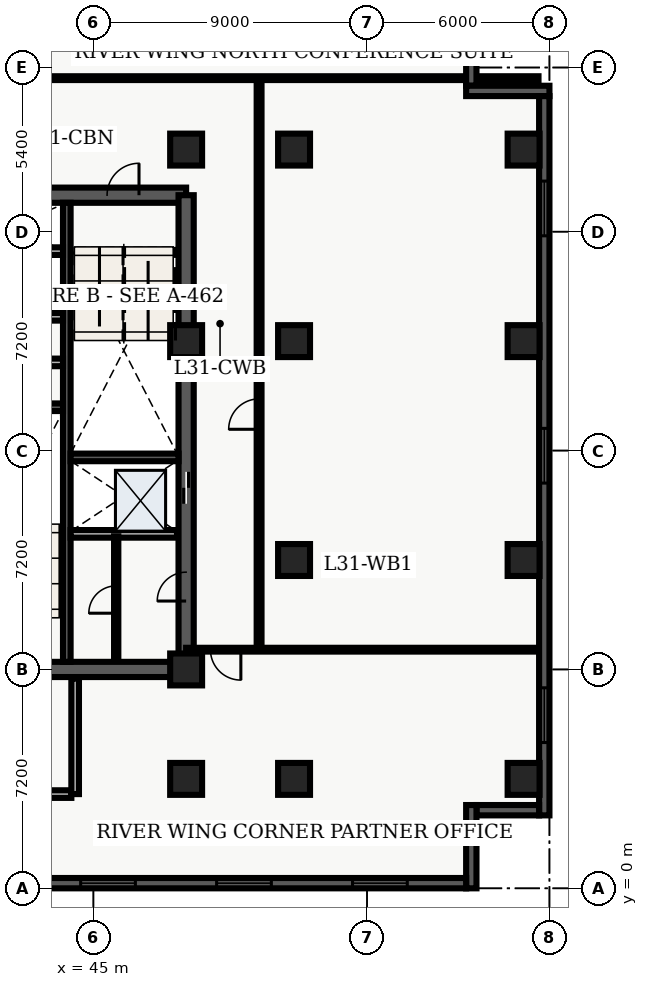
"""IFC4 building model, lengths in metres.
Left out: names, types, materials, properties, quantities, classifications, styles, units other than length and angle.
Written with IfcOpenShell. Run it as: python <this file> out.ifc"""

import sys

from ifc_helpers import new_model, entity, si_unit, converted_unit, direction, frame, origin_with_axes, origin_2d_with_axis, place, context, subcontext, project, spatial, polyline, rectangle, outline, extrude, element, fill, save


model = new_model("IFC4")
c1 = context("Model", 3, precision=1e-05, world=origin_with_axes(), true_north=direction((0.0, 1.0)))
c2 = subcontext(c1, "Body", "Model", "MODEL_VIEW")
j1 = project(units=[si_unit("LENGTHUNIT", "METRE"), converted_unit("PLANEANGLEUNIT", "DEGREE", entity("IfcPlaneAngleMeasure", 0.017), si_unit("PLANEANGLEUNIT", "RADIAN"), dimensions=[0, 0, 0, 0, 0, 0, 0])], contexts=[c1])
p1 = place(None, origin_with_axes())
s1 = spatial("IfcSite", under=j1, at=p1, CompositionType="ELEMENT")
p2 = place(p1, origin_with_axes())
s2 = spatial("IfcBuilding", under=s1, at=p2, CompositionType="ELEMENT")
p3 = place(p2, frame((0.0, 0.0, 129.0), z_axis=(0.0, 0.0, 1.0), x_axis=(1.0, 0.0, 0.0)))
s3 = spatial("IfcBuildingStorey", under=s2, at=p3, CompositionType="ELEMENT", Elevation=129.0)
p4 = place(p3, frame((40.2, 7.2, 0.0), z_axis=(0.0, 0.0, 1.0), x_axis=(1.0, 0.0, 0.0)))
e1 = element("IfcWall", 1, at=p4, inside=s3, PredefinedType="SHEAR", context=c2, shape_type="SweptSolid", body=[
    extrude(outline(polyline([(0.0, -0.25), (7.85, -0.25), (7.85, 0.25), (0.0, 0.25), (0.0, -0.25)])), origin_with_axes(), (0.0, 0.0, 1.0), 3.66),
])
p5 = place(p4, frame((2.175, 0.0, 0.0), z_axis=(0.0, 0.0, 1.0), x_axis=(1.0, 0.0, 0.0)))
e2 = element("IfcOpeningElement", 2, at=p5, cuts=e1, PredefinedType="OPENING", context=c2, shape_type="SweptSolid", body=[
    extrude(rectangle(XDim=1.05, YDim=0.52, at=origin_2d_with_axis()), origin_with_axes(), (0.0, 0.0, 1.0), 2.15),
])
p6 = place(p3, frame((40.2, 22.8, 0.0), z_axis=(0.0, 0.0, 1.0), x_axis=(1.0, 0.0, 0.0)))
e3 = element("IfcWall", 3, at=p6, inside=s3, PredefinedType="SHEAR", context=c2, shape_type="SweptSolid", body=[
    extrude(outline(polyline([(0.0, -0.25), (7.85, -0.25), (7.85, 0.25), (0.0, 0.25), (0.0, -0.25)])), origin_with_axes(), (0.0, 0.0, 1.0), 3.66),
])
p7 = place(p6, frame((5.775, 0.0, 0.0), z_axis=(0.0, 0.0, 1.0), x_axis=(1.0, 0.0, 0.0)))
e4 = element("IfcOpeningElement", 4, at=p7, cuts=e3, PredefinedType="OPENING", context=c2, shape_type="SweptSolid", body=[
    extrude(rectangle(XDim=1.05, YDim=0.52, at=origin_2d_with_axis()), origin_with_axes(), (0.0, 0.0, 1.0), 2.15),
])
p8 = place(p3, frame((48.05, 7.2, 0.0), z_axis=(0.0, 0.0, 1.0), x_axis=(0.0, 1.0, 0.0)))
e5 = element("IfcWall", 5, at=p8, inside=s3, PredefinedType="SHEAR", context=c2, shape_type="SweptSolid", body=[
    extrude(outline(polyline([(0.0, -0.25), (15.6, -0.25), (15.6, 0.25), (0.0, 0.25), (0.0, -0.25)])), origin_with_axes(), (0.0, 0.0, 1.0), 3.66),
])
p9 = place(p8, frame((5.975, 0.0, 0.0), z_axis=(0.0, 0.0, 1.0), x_axis=(1.0, 0.0, 0.0)))
e6 = element("IfcOpeningElement", 6, at=p9, cuts=e5, PredefinedType="OPENING", context=c2, shape_type="SweptSolid", body=[
    extrude(rectangle(XDim=1.05, YDim=0.52, at=origin_2d_with_axis()), origin_with_axes(), (0.0, 0.0, 1.0), 2.15),
])
p10 = place(p8, frame((2.725, 0.0, 0.0), z_axis=(0.0, 0.0, 1.0), x_axis=(1.0, 0.0, 0.0)))
e7 = element("IfcOpeningElement", 7, at=p10, cuts=e5, PredefinedType="OPENING", context=c2, shape_type="SweptSolid", body=[
    extrude(rectangle(XDim=0.95, YDim=0.52, at=origin_2d_with_axis()), origin_with_axes(), (0.0, 0.0, 1.0), 2.15),
])
p11 = place(p3, frame((44.125, 7.45, 0.0), z_axis=(0.0, 0.0, 1.0), x_axis=(0.0, 1.0, 0.0)))
e8 = element("IfcWall", 8, at=p11, inside=s3, PredefinedType="SHEAR", context=c2, shape_type="SweptSolid", body=[
    extrude(outline(polyline([(0.0, -0.125), (15.1, -0.125), (15.1, 0.125), (0.0, 0.125), (0.0, -0.125)])), origin_with_axes(), (0.0, 0.0, 1.0), 3.66),
])
for number, where, z_axis, x_axis in (
    (9, (40.45, 15.825, 0.0), (0.0, 0.0, 1.0), (1.0, 0.0, 0.0)),
    (10, (44.25, 14.175, 0.0), (0.0, 0.0, 1.0), (1.0, 0.0, 0.0)),
):
    element("IfcWall", number, at=place(p3, frame(where, z_axis=z_axis, x_axis=x_axis)), inside=s3, PredefinedType="SHEAR", context=c2, shape_type="SweptSolid", body=[
        extrude(outline(polyline([(0.0, -0.125), (3.55, -0.125), (3.55, 0.125), (0.0, 0.125), (0.0, -0.125)])), origin_with_axes(), (0.0, 0.0, 1.0), 3.66),
    ])
p12 = place(p3, frame((40.5, 17.3, 0.0), z_axis=(0.0, 0.0, 1.0), x_axis=(1.0, 0.0, 0.0)))
e11 = element("IfcWall", 11, at=p12, inside=s3, PredefinedType="SOLIDWALL", context=c2, shape_type="SweptSolid", body=[
    extrude(outline(polyline([(0.0, -0.125), (3.5, -0.125), (3.5, 0.125), (0.0, 0.125), (0.0, -0.125)])), origin_with_axes(), (0.0, 0.0, 1.0), 2.7),
])
p13 = place(p12, frame((2.4, 0.0, 0.0), z_axis=(0.0, 0.0, 1.0), x_axis=(1.0, 0.0, 0.0)))
e12 = element("IfcOpeningElement", 12, at=p13, cuts=e11, PredefinedType="OPENING", context=c2, shape_type="SweptSolid", body=[
    extrude(rectangle(XDim=0.9, YDim=0.27, at=origin_2d_with_axis()), origin_with_axes(), (0.0, 0.0, 1.0), 2.15),
])
p14 = place(p3, frame((40.5, 18.8, 0.0), z_axis=(0.0, 0.0, 1.0), x_axis=(1.0, 0.0, 0.0)))
e13 = element("IfcWall", 13, at=p14, inside=s3, PredefinedType="SOLIDWALL", context=c2, shape_type="SweptSolid", body=[
    extrude(outline(polyline([(0.0, -0.125), (3.5, -0.125), (3.5, 0.125), (0.0, 0.125), (0.0, -0.125)])), origin_with_axes(), (0.0, 0.0, 1.0), 2.7),
])
p15 = place(p3, frame((40.325, 3.1, 0.0), z_axis=(0.0, 0.0, 1.0), x_axis=(1.0, 0.0, 0.0)))
e14 = element("IfcWall", 14, at=p15, inside=s3, PredefinedType="SOLIDWALL", context=c2, shape_type="SweptSolid", body=[
    extrude(outline(polyline([(0.0, -0.125), (3.95, -0.125), (3.95, 0.125), (0.0, 0.125), (0.0, -0.125)])), origin_with_axes(), (0.0, 0.0, 1.0), 2.7),
])
p16 = place(p3, frame((44.4, 3.1, 0.0), z_axis=(0.0, 0.0, 1.0), x_axis=(0.0, 1.0, 0.0)))
e15 = element("IfcWall", 15, at=p16, inside=s3, PredefinedType="SOLIDWALL", context=c2, shape_type="SweptSolid", body=[
    extrude(outline(polyline([(0.0, -0.125), (3.8, -0.125), (3.8, 0.125), (0.0, 0.125), (0.0, -0.125)])), origin_with_axes(), (0.0, 0.0, 1.0), 2.7),
])
for number, where, z_axis, x_axis in (
    (16, (48.05, 3.6, 0.0), (0.0, 0.0, 1.0), (1.0, 0.0, 0.0)),
    (17, (48.05, 7.2, 0.0), (0.0, 0.0, 1.0), (1.0, 0.0, 0.0)),
    (18, (48.05, 18.0, 0.0), (0.0, 0.0, 1.0), (1.0, 0.0, 0.0)),
    (19, (48.05, 24.3, 0.0), (0.0, 0.0, 1.0), (1.0, 0.0, 0.0)),
    (20, (51.6, 3.6, 0.0), (0.0, 0.0, 1.0), (1.0, 0.0, 0.0)),
    (21, (51.6, 10.8, 0.0), (0.0, 0.0, 1.0), (1.0, 0.0, 0.0)),
    (22, (51.6, 18.0, 0.0), (0.0, 0.0, 1.0), (1.0, 0.0, 0.0)),
    (23, (51.6, 24.3, 0.0), (0.0, 0.0, 1.0), (1.0, 0.0, 0.0)),
    (24, (59.15, 3.6, 0.0), (0.0, 0.0, 1.0), (1.0, 0.0, 0.0)),
    (25, (59.15, 10.8, 0.0), (0.0, 0.0, 1.0), (1.0, 0.0, 0.0)),
    (26, (59.15, 18.0, 0.0), (0.0, 0.0, 1.0), (1.0, 0.0, 0.0)),
    (27, (59.15, 24.3, 0.0), (0.0, 0.0, 1.0), (1.0, 0.0, 0.0)),
):
    element("IfcColumn", number, at=place(p3, frame(where, z_axis=z_axis, x_axis=x_axis)), inside=s3, PredefinedType="COLUMN", context=c2, shape_type="SweptSolid", body=[
        extrude(rectangle(XDim=1.05, YDim=1.05, at=origin_2d_with_axis()), origin_with_axes(), (0.0, 0.0, 1.0), 3.9),
    ])
for number, where, z_axis, x_axis in (
    (28, (40.5, 20.96, 0.0), (0.0, 0.0, 1.0), (1.0, 0.0, 0.0)),
    (29, (44.25, 11.66, 0.0), (0.0, 0.0, 1.0), (1.0, 0.0, 0.0)),
):
    element("IfcWall", number, at=place(p3, frame(where, z_axis=z_axis, x_axis=x_axis)), inside=s3, PredefinedType="SOLIDWALL", context=c2, shape_type="SweptSolid", body=[
        extrude(outline(polyline([(0.0, -0.125), (3.5, -0.125), (3.5, 0.125), (0.0, 0.125), (0.0, -0.125)])), origin_with_axes(), (0.0, 0.0, 1.0), 2.7),
    ])
p17 = place(p3, frame((45.75, 7.5, 0.0), z_axis=(0.0, 0.0, 1.0), x_axis=(0.0, 1.0, 0.0)))
e30 = element("IfcWall", 30, at=p17, inside=s3, PredefinedType="PARTITIONING", context=c2, shape_type="SweptSolid", body=[
    extrude(outline(polyline([(0.0, -0.07), (4.08, -0.07), (4.08, 0.07), (0.0, 0.07), (0.0, -0.07)])), origin_with_axes(), (0.0, 0.0, 1.0), 2.7),
])
p18 = place(p17, frame((2.0, 0.0, 0.0), z_axis=(0.0, 0.0, 1.0), x_axis=(1.0, 0.0, 0.0)))
e31 = element("IfcOpeningElement", 31, at=p18, cuts=e30, PredefinedType="OPENING", context=c2, shape_type="SweptSolid", body=[
    extrude(rectangle(XDim=0.9, YDim=0.16, at=origin_2d_with_axis()), origin_with_axes(), (0.0, 0.0, 1.0), 2.15),
])
p19 = place(p3, frame((50.45, 7.85, 0.0), z_axis=(0.0, 0.0, 1.0), x_axis=(0.0, 1.0, 0.0)))
e32 = element("IfcWall", 32, at=p19, inside=s3, PredefinedType="PARTITIONING", context=c2, shape_type="SweptSolid", body=[
    extrude(outline(polyline([(0.0, -0.08), (18.8, -0.08), (18.8, 0.08), (0.0, 0.08), (0.0, -0.08)])), origin_with_axes(), (0.0, 0.0, 1.0), 2.7),
])
p20 = place(p19, frame((7.75, 0.0, 0.0), z_axis=(0.0, 0.0, 1.0), x_axis=(1.0, 0.0, 0.0)))
e33 = element("IfcOpeningElement", 33, at=p20, cuts=e32, PredefinedType="OPENING", context=c2, shape_type="SweptSolid", body=[
    extrude(rectangle(XDim=1.0, YDim=0.18, at=origin_2d_with_axis()), origin_with_axes(), (0.0, 0.0, 1.0), 2.15),
])
p21 = place(p3, frame((59.665, 7.85, 0.0), z_axis=(0.0, 0.0, 1.0), x_axis=(-1.0, 0.0, 0.0)))
e34 = element("IfcWall", 34, at=p21, inside=s3, PredefinedType="PARTITIONING", context=c2, shape_type="SweptSolid", body=[
    extrude(outline(polyline([(0.0, -0.062), (11.615, -0.062), (11.615, 0.062), (0.0, 0.062), (0.0, -0.062)])), origin_with_axes(), (0.0, 0.0, 1.0), 2.7),
])
p22 = place(p21, frame((10.315, 0.0, 0.0), z_axis=(0.0, 0.0, 1.0), x_axis=(1.0, 0.0, 0.0)))
e35 = element("IfcOpeningElement", 35, at=p22, cuts=e34, PredefinedType="OPENING", context=c2, shape_type="SweptSolid", body=[
    extrude(rectangle(XDim=1.0, YDim=0.145, at=origin_2d_with_axis()), origin_with_axes(), (0.0, 0.0, 1.0), 2.15),
])
p23 = place(p3, frame((38.735, 26.65, 0.0), z_axis=(0.0, 0.0, 1.0), x_axis=(1.0, 0.0, 0.0)))
e36 = element("IfcWall", 36, at=p23, inside=s3, PredefinedType="PARTITIONING", context=c2, shape_type="SweptSolid", body=[
    extrude(outline(polyline([(0.0, -0.062), (20.905, -0.062), (20.905, 0.062), (0.0, 0.062), (0.0, -0.062)])), origin_with_axes(), (0.0, 0.0, 1.0), 2.7),
])
p24 = place(p23, frame((4.265, 0.0, 0.0), z_axis=(0.0, 0.0, 1.0), x_axis=(1.0, 0.0, 0.0)))
e37 = element("IfcOpeningElement", 37, at=p24, cuts=e36, PredefinedType="OPENING", context=c2, shape_type="SweptSolid", body=[
    extrude(rectangle(XDim=1.0, YDim=0.145, at=origin_2d_with_axis()), origin_with_axes(), (0.0, 0.0, 1.0), 2.15),
])
p25 = place(p3, frame((57.43, 28.46, 0.0), z_axis=(0.0, 0.0, 1.0), x_axis=(0.0, -1.0, 0.0)))
e38 = element("IfcWall", 38, at=p25, inside=s3, PredefinedType="SOLIDWALL", context=c2, shape_type="SweptSolid", body=[
    extrude(outline(polyline([(0.0, -0.17), (2.06, -0.17), (2.06, 0.17), (0.0, 0.17), (0.0, -0.17)])), origin_with_axes(), (0.0, 0.0, 1.0), 3.66),
])
p26 = place(p3, frame((57.26, 26.23, 0.0), z_axis=(0.0, 0.0, 1.0), x_axis=(1.0, 0.0, 0.0)))
e39 = element("IfcWall", 39, at=p26, inside=s3, PredefinedType="SOLIDWALL", context=c2, shape_type="SweptSolid", body=[
    extrude(outline(polyline([(0.0, -0.17), (2.74, -0.17), (2.74, 0.17), (0.0, 0.17), (0.0, -0.17)])), origin_with_axes(), (0.0, 0.0, 1.0), 3.66),
])
p27 = place(p3, frame((59.83, 26.06, 0.0), z_axis=(0.0, 0.0, 1.0), x_axis=(0.0, -1.0, 0.0)))
e40 = element("IfcWall", 40, at=p27, inside=s3, PredefinedType="SOLIDWALL", context=c2, shape_type="SweptSolid", body=[
    extrude(outline(polyline([(0.0, -0.17), (23.66, -0.17), (23.66, 0.17), (0.0, 0.17), (0.0, -0.17)])), origin_with_axes(), (0.0, 0.0, 1.0), 3.66),
])
p28 = place(p27, frame((3.696, 0.0, 0.45), z_axis=(0.0, 0.0, 1.0), x_axis=(1.0, 0.0, 0.0)))
e41 = element("IfcOpeningElement", 41, at=p28, cuts=e40, PredefinedType="OPENING", context=c2, shape_type="SweptSolid", body=[
    extrude(rectangle(XDim=1.8, YDim=0.36, at=origin_2d_with_axis()), origin_with_axes(), (0.0, 0.0, 1.0), 2.1),
])
p29 = place(p27, frame((11.83, 0.0, 0.45), z_axis=(0.0, 0.0, 1.0), x_axis=(1.0, 0.0, 0.0)))
e42 = element("IfcOpeningElement", 42, at=p29, cuts=e40, PredefinedType="OPENING", context=c2, shape_type="SweptSolid", body=[
    extrude(rectangle(XDim=1.8, YDim=0.36, at=origin_2d_with_axis()), origin_with_axes(), (0.0, 0.0, 1.0), 2.1),
])
p30 = place(p27, frame((20.364, 0.0, 0.45), z_axis=(0.0, 0.0, 1.0), x_axis=(1.0, 0.0, 0.0)))
e43 = element("IfcOpeningElement", 43, at=p30, cuts=e40, PredefinedType="OPENING", context=c2, shape_type="SweptSolid", body=[
    extrude(rectangle(XDim=1.8, YDim=0.36, at=origin_2d_with_axis()), origin_with_axes(), (0.0, 0.0, 1.0), 2.1),
])
p31 = place(p3, frame((59.66, 2.57, 0.0), z_axis=(0.0, 0.0, 1.0), x_axis=(-1.0, 0.0, 0.0)))
e44 = element("IfcWall", 44, at=p31, inside=s3, PredefinedType="SOLIDWALL", context=c2, shape_type="SweptSolid", body=[
    extrude(outline(polyline([(0.0, -0.17), (2.06, -0.17), (2.06, 0.17), (0.0, 0.17), (0.0, -0.17)])), origin_with_axes(), (0.0, 0.0, 1.0), 3.66),
])
p32 = place(p3, frame((57.43, 2.74, 0.0), z_axis=(0.0, 0.0, 1.0), x_axis=(0.0, -1.0, 0.0)))
e45 = element("IfcWall", 45, at=p32, inside=s3, PredefinedType="SOLIDWALL", context=c2, shape_type="SweptSolid", body=[
    extrude(outline(polyline([(0.0, -0.17), (2.74, -0.17), (2.74, 0.17), (0.0, 0.17), (0.0, -0.17)])), origin_with_axes(), (0.0, 0.0, 1.0), 3.66),
])
p33 = place(p3, frame((57.26, 0.17, 0.0), z_axis=(0.0, 0.0, 1.0), x_axis=(-1.0, 0.0, 0.0)))
e46 = element("IfcWall", 46, at=p33, inside=s3, PredefinedType="SOLIDWALL", context=c2, shape_type="SweptSolid", body=[
    extrude(outline(polyline([(0.0, -0.17), (54.86, -0.17), (54.86, 0.17), (0.0, 0.17), (0.0, -0.17)])), origin_with_axes(), (0.0, 0.0, 1.0), 3.66),
])
p34 = place(p33, frame((2.836, 0.0, 0.45), z_axis=(0.0, 0.0, 1.0), x_axis=(1.0, 0.0, 0.0)))
e47 = element("IfcOpeningElement", 47, at=p34, cuts=e46, PredefinedType="OPENING", context=c2, shape_type="SweptSolid", body=[
    extrude(rectangle(XDim=1.8, YDim=0.36, at=origin_2d_with_axis()), origin_with_axes(), (0.0, 0.0, 1.0), 2.1),
])
p35 = place(p33, frame((7.307, 0.0, 0.45), z_axis=(0.0, 0.0, 1.0), x_axis=(1.0, 0.0, 0.0)))
e48 = element("IfcOpeningElement", 48, at=p35, cuts=e46, PredefinedType="OPENING", context=c2, shape_type="SweptSolid", body=[
    extrude(rectangle(XDim=1.8, YDim=0.36, at=origin_2d_with_axis()), origin_with_axes(), (0.0, 0.0, 1.0), 2.1),
])
p36 = place(p33, frame((11.779, 0.0, 0.45), z_axis=(0.0, 0.0, 1.0), x_axis=(1.0, 0.0, 0.0)))
e49 = element("IfcOpeningElement", 49, at=p36, cuts=e46, PredefinedType="OPENING", context=c2, shape_type="SweptSolid", body=[
    extrude(rectangle(XDim=1.8, YDim=0.36, at=origin_2d_with_axis()), origin_with_axes(), (0.0, 0.0, 1.0), 2.1),
])
p37 = place(p33, frame((16.251, 0.0, 0.45), z_axis=(0.0, 0.0, 1.0), x_axis=(1.0, 0.0, 0.0)))
e50 = element("IfcOpeningElement", 50, at=p37, cuts=e46, PredefinedType="OPENING", context=c2, shape_type="SweptSolid", body=[
    extrude(rectangle(XDim=1.8, YDim=0.36, at=origin_2d_with_axis()), origin_with_axes(), (0.0, 0.0, 1.0), 2.1),
])
p38 = place(p33, frame((20.723, 0.0, 0.45), z_axis=(0.0, 0.0, 1.0), x_axis=(1.0, 0.0, 0.0)))
e51 = element("IfcOpeningElement", 51, at=p38, cuts=e46, PredefinedType="OPENING", context=c2, shape_type="SweptSolid", body=[
    extrude(rectangle(XDim=1.8, YDim=0.36, at=origin_2d_with_axis()), origin_with_axes(), (0.0, 0.0, 1.0), 2.1),
])
p39 = place(p33, frame((25.194, 0.0, 0.45), z_axis=(0.0, 0.0, 1.0), x_axis=(1.0, 0.0, 0.0)))
e52 = element("IfcOpeningElement", 52, at=p39, cuts=e46, PredefinedType="OPENING", context=c2, shape_type="SweptSolid", body=[
    extrude(rectangle(XDim=1.8, YDim=0.36, at=origin_2d_with_axis()), origin_with_axes(), (0.0, 0.0, 1.0), 2.1),
])
p40 = place(p33, frame((29.666, 0.0, 0.45), z_axis=(0.0, 0.0, 1.0), x_axis=(1.0, 0.0, 0.0)))
e53 = element("IfcOpeningElement", 53, at=p40, cuts=e46, PredefinedType="OPENING", context=c2, shape_type="SweptSolid", body=[
    extrude(rectangle(XDim=1.8, YDim=0.36, at=origin_2d_with_axis()), origin_with_axes(), (0.0, 0.0, 1.0), 2.1),
])
p41 = place(p33, frame((34.138, 0.0, 0.45), z_axis=(0.0, 0.0, 1.0), x_axis=(1.0, 0.0, 0.0)))
e54 = element("IfcOpeningElement", 54, at=p41, cuts=e46, PredefinedType="OPENING", context=c2, shape_type="SweptSolid", body=[
    extrude(rectangle(XDim=1.8, YDim=0.36, at=origin_2d_with_axis()), origin_with_axes(), (0.0, 0.0, 1.0), 2.1),
])
p42 = place(p33, frame((38.159, 0.0, 0.45), z_axis=(0.0, 0.0, 1.0), x_axis=(1.0, 0.0, 0.0)))
e55 = element("IfcOpeningElement", 55, at=p42, cuts=e46, PredefinedType="OPENING", context=c2, shape_type="SweptSolid", body=[
    extrude(rectangle(XDim=1.8, YDim=0.36, at=origin_2d_with_axis()), origin_with_axes(), (0.0, 0.0, 1.0), 2.1),
])
p43 = place(p33, frame((43.081, 0.0, 0.45), z_axis=(0.0, 0.0, 1.0), x_axis=(1.0, 0.0, 0.0)))
e56 = element("IfcOpeningElement", 56, at=p43, cuts=e46, PredefinedType="OPENING", context=c2, shape_type="SweptSolid", body=[
    extrude(rectangle(XDim=1.8, YDim=0.36, at=origin_2d_with_axis()), origin_with_axes(), (0.0, 0.0, 1.0), 2.1),
])
p44 = place(p33, frame((47.553, 0.0, 0.45), z_axis=(0.0, 0.0, 1.0), x_axis=(1.0, 0.0, 0.0)))
e57 = element("IfcOpeningElement", 57, at=p44, cuts=e46, PredefinedType="OPENING", context=c2, shape_type="SweptSolid", body=[
    extrude(rectangle(XDim=1.8, YDim=0.36, at=origin_2d_with_axis()), origin_with_axes(), (0.0, 0.0, 1.0), 2.1),
])
p45 = place(p33, frame((52.024, 0.0, 0.45), z_axis=(0.0, 0.0, 1.0), x_axis=(1.0, 0.0, 0.0)))
e58 = element("IfcOpeningElement", 58, at=p45, cuts=e46, PredefinedType="OPENING", context=c2, shape_type="SweptSolid", body=[
    extrude(rectangle(XDim=1.8, YDim=0.36, at=origin_2d_with_axis()), origin_with_axes(), (0.0, 0.0, 1.0), 2.1),
])
p46 = place(p8, frame((5.975, 0.0, 0.0), z_axis=(0.0, 0.0, 1.0), x_axis=(1.0, 0.0, 0.0)))
e59 = element("IfcDoor", 59, at=p46, inside=s3, OperationType="SLIDING_TO_LEFT", PredefinedType="DOOR", context=c2, shape_type="SweptSolid", body=[
    extrude(rectangle(XDim=1.05, YDim=0.09, at=origin_2d_with_axis()), origin_with_axes(), (0.0, 0.0, 1.0), 2.15),
])
fill(e6, e59)
p47 = place(p6, frame((5.775, 0.0, 0.0), z_axis=(0.0, 0.0, 1.0), x_axis=(1.0, 0.0, 0.0)))
e60 = element("IfcDoor", 60, at=p47, inside=s3, OperationType="SINGLE_SWING_RIGHT", PredefinedType="DOOR", context=c2, shape_type="SweptSolid", body=[
    extrude(rectangle(XDim=1.05, YDim=0.09, at=origin_2d_with_axis()), origin_with_axes(), (0.0, 0.0, 1.0), 2.15),
])
fill(e4, e60)
p48 = place(p17, frame((2.0, 0.0, 0.0), z_axis=(0.0, 0.0, 1.0), x_axis=(1.0, 0.0, 0.0)))
e61 = element("IfcDoor", 61, at=p48, inside=s3, OperationType="SINGLE_SWING_LEFT", PredefinedType="DOOR", context=c2, shape_type="SweptSolid", body=[
    extrude(rectangle(XDim=0.9, YDim=0.084, at=origin_2d_with_axis()), origin_with_axes(), (0.0, 0.0, 1.0), 2.15),
])
fill(e31, e61)
p49 = place(p8, frame((2.725, 0.0, 0.0), z_axis=(0.0, 0.0, 1.0), x_axis=(1.0, 0.0, 0.0)))
e62 = element("IfcDoor", 62, at=p49, inside=s3, OperationType="SINGLE_SWING_LEFT", PredefinedType="DOOR", context=c2, shape_type="SweptSolid", body=[
    extrude(rectangle(XDim=0.95, YDim=0.09, at=origin_2d_with_axis()), origin_with_axes(), (0.0, 0.0, 1.0), 2.15),
])
fill(e7, e62)
p50 = place(p21, frame((10.315, 0.0, 0.0), z_axis=(0.0, 0.0, 1.0), x_axis=(1.0, 0.0, 0.0)))
e63 = element("IfcDoor", 63, at=p50, inside=s3, OperationType="SINGLE_SWING_LEFT", PredefinedType="DOOR", context=c2, shape_type="SweptSolid", body=[
    extrude(rectangle(XDim=1.0, YDim=0.075, at=origin_2d_with_axis()), origin_with_axes(), (0.0, 0.0, 1.0), 2.15),
])
fill(e35, e63)
p51 = place(p19, frame((7.75, 0.0, 0.0), z_axis=(0.0, 0.0, 1.0), x_axis=(1.0, 0.0, 0.0)))
e64 = element("IfcDoor", 64, at=p51, inside=s3, OperationType="SINGLE_SWING_LEFT", PredefinedType="DOOR", context=c2, shape_type="SweptSolid", body=[
    extrude(rectangle(XDim=1.0, YDim=0.09, at=origin_2d_with_axis()), origin_with_axes(), (0.0, 0.0, 1.0), 2.15),
])
fill(e33, e64)
p52 = place(p27, frame((3.696, 0.0, 0.45), z_axis=(0.0, 0.0, 1.0), x_axis=(1.0, 0.0, 0.0)))
e65 = element("IfcWindow", 65, at=p52, inside=s3, PredefinedType="WINDOW", context=c2, shape_type="SweptSolid", body=[
    extrude(rectangle(XDim=1.8, YDim=0.09, at=origin_2d_with_axis()), origin_with_axes(), (0.0, 0.0, 1.0), 2.1),
])
fill(e41, e65)
p53 = place(p27, frame((11.83, 0.0, 0.45), z_axis=(0.0, 0.0, 1.0), x_axis=(1.0, 0.0, 0.0)))
e66 = element("IfcWindow", 66, at=p53, inside=s3, PredefinedType="WINDOW", context=c2, shape_type="SweptSolid", body=[
    extrude(rectangle(XDim=1.8, YDim=0.09, at=origin_2d_with_axis()), origin_with_axes(), (0.0, 0.0, 1.0), 2.1),
])
fill(e42, e66)
p54 = place(p27, frame((20.364, 0.0, 0.45), z_axis=(0.0, 0.0, 1.0), x_axis=(1.0, 0.0, 0.0)))
e67 = element("IfcWindow", 67, at=p54, inside=s3, PredefinedType="WINDOW", context=c2, shape_type="SweptSolid", body=[
    extrude(rectangle(XDim=1.8, YDim=0.09, at=origin_2d_with_axis()), origin_with_axes(), (0.0, 0.0, 1.0), 2.1),
])
fill(e43, e67)
p55 = place(p33, frame((2.836, 0.0, 0.45), z_axis=(0.0, 0.0, 1.0), x_axis=(1.0, 0.0, 0.0)))
e68 = element("IfcWindow", 68, at=p55, inside=s3, PredefinedType="WINDOW", context=c2, shape_type="SweptSolid", body=[
    extrude(rectangle(XDim=1.8, YDim=0.09, at=origin_2d_with_axis()), origin_with_axes(), (0.0, 0.0, 1.0), 2.1),
])
fill(e47, e68)
p56 = place(p33, frame((7.307, 0.0, 0.45), z_axis=(0.0, 0.0, 1.0), x_axis=(1.0, 0.0, 0.0)))
e69 = element("IfcWindow", 69, at=p56, inside=s3, PredefinedType="WINDOW", context=c2, shape_type="SweptSolid", body=[
    extrude(rectangle(XDim=1.8, YDim=0.09, at=origin_2d_with_axis()), origin_with_axes(), (0.0, 0.0, 1.0), 2.1),
])
fill(e48, e69)
p57 = place(p33, frame((11.779, 0.0, 0.45), z_axis=(0.0, 0.0, 1.0), x_axis=(1.0, 0.0, 0.0)))
e70 = element("IfcWindow", 70, at=p57, inside=s3, PredefinedType="WINDOW", context=c2, shape_type="SweptSolid", body=[
    extrude(rectangle(XDim=1.8, YDim=0.09, at=origin_2d_with_axis()), origin_with_axes(), (0.0, 0.0, 1.0), 2.1),
])
fill(e49, e70)
save(model, sys.argv[1])
